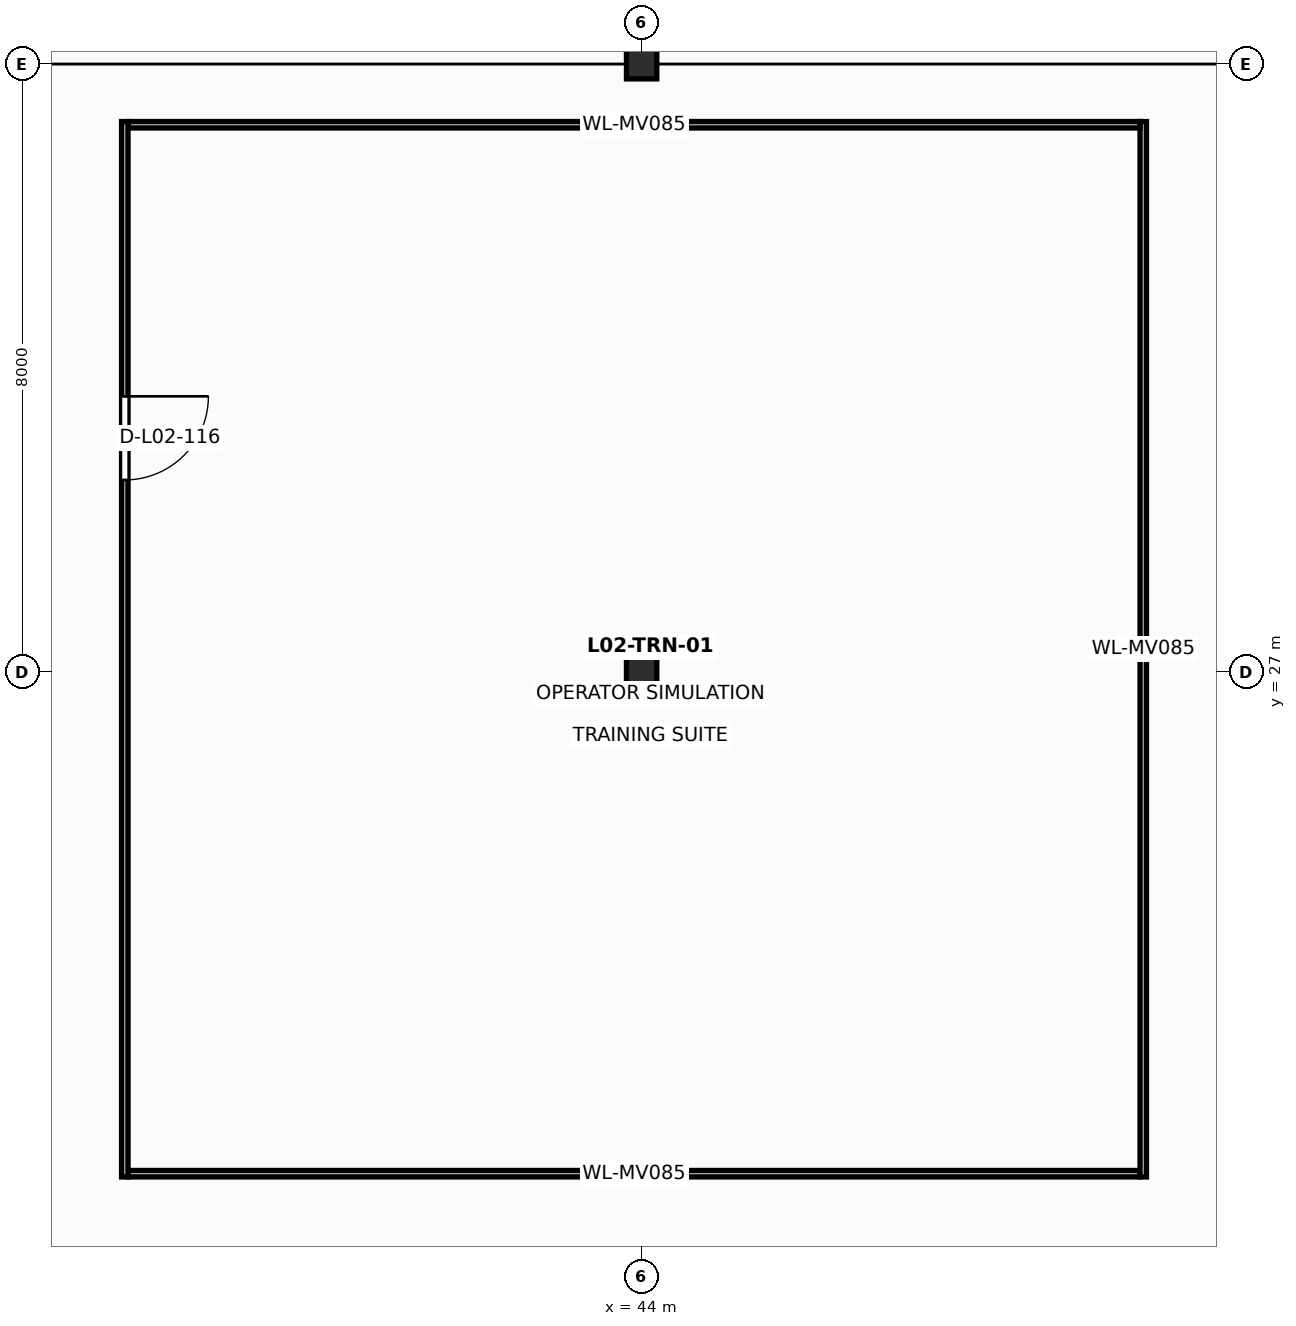
"""IFC4 building model, lengths in metres.
Left out: names, types, materials, properties, quantities, classifications, styles, units other than length and angle.
Written with IfcOpenShell. Run it as: python <this file> out.ifc"""

import sys

from ifc_helpers import new_model, si_unit, direction, frame, frame_2d, origin, origin_2d, place, context, subcontext, project, spatial, rectangle, i_section, extrude, element, fill, save


model = new_model("IFC4")
c1 = context("Model", 3, precision=1e-05, world=origin(), true_north=direction((0.0, 1.0)))
c2 = subcontext(c1, "Body", "Model", "MODEL_VIEW")
j1 = project(units=[si_unit("LENGTHUNIT", "METRE"), si_unit("PLANEANGLEUNIT", "RADIAN")], contexts=[c1])
p1 = place(None, origin())
s1 = spatial("IfcSite", under=j1, at=p1, CompositionType="ELEMENT")
p2 = place(p1, origin())
s2 = spatial("IfcBuilding", under=s1, at=p2, CompositionType="ELEMENT")
p3 = place(p2, frame((0.0, 0.0, 11.2)))
s3 = spatial("IfcBuildingStorey", under=s2, at=p3, CompositionType="ELEMENT", Elevation=11.2)
for number, where, z_axis, x_axis in (
    (1, (44.0, 27.0, 0.0), (0.0, 0.0, 1.0), (1.0, 0.0, 0.0)),
    (2, (44.0, 35.0, 0.0), (0.0, 0.0, 1.0), (1.0, 0.0, 0.0)),
):
    element("IfcColumn", number, at=place(p3, frame(where, z_axis=z_axis, x_axis=x_axis)), inside=s3, PredefinedType="COLUMN", context=c2, shape_type="SweptSolid", body=[
        extrude(i_section(OverallWidth=0.399, OverallDepth=0.393, WebThickness=0.023, FlangeThickness=0.037, at=origin_2d()), origin(), (0.0, 0.0, 1.0), 4.4),
    ])
p4 = place(p3, frame((37.242, 20.4, 0.0), z_axis=(0.0, 0.0, 1.0), x_axis=(1.0, 0.0, 0.0)))
e3 = element("IfcWall", 3, at=p4, inside=s3, PredefinedType="MOVABLE", context=c2, shape_type="SweptSolid", body=[
    extrude(rectangle(XDim=13.316, YDim=0.085, at=frame_2d((6.658, 0.0))), origin(), (0.0, 0.0, 1.0), 4.12),
])
p5 = place(p3, frame((50.6, 20.357, 0.0), z_axis=(0.0, 0.0, 1.0), x_axis=(0.0, 1.0, 0.0)))
e4 = element("IfcWall", 4, at=p5, inside=s3, PredefinedType="MOVABLE", context=c2, shape_type="SweptSolid", body=[
    extrude(rectangle(XDim=13.885, YDim=0.085, at=frame_2d((6.942, 0.0))), origin(), (0.0, 0.0, 1.0), 4.12),
])
p6 = place(p3, frame((50.558, 34.2, 0.0), z_axis=(0.0, 0.0, 1.0), x_axis=(-1.0, 0.0, 0.0)))
e5 = element("IfcWall", 5, at=p6, inside=s3, PredefinedType="MOVABLE", context=c2, shape_type="SweptSolid", body=[
    extrude(rectangle(XDim=13.316, YDim=0.085, at=frame_2d((6.658, 0.0))), origin(), (0.0, 0.0, 1.0), 4.12),
])
p7 = place(p3, frame((37.2, 34.242, 0.0), z_axis=(0.0, 0.0, 1.0), x_axis=(0.0, -1.0, 0.0)))
e6 = element("IfcWall", 6, at=p7, inside=s3, PredefinedType="MOVABLE", context=c2, shape_type="SweptSolid", body=[
    extrude(rectangle(XDim=13.885, YDim=0.085, at=frame_2d((6.942, 0.0))), origin(), (0.0, 0.0, 1.0), 4.12),
])
p8 = place(p7, frame((3.615, 0.0, 0.0)))
e7 = element("IfcOpeningElement", 7, at=p8, cuts=e6, PredefinedType="OPENING", context=c2, shape_type="SweptSolid", body=[
    extrude(rectangle(XDim=1.1, YDim=2.18, at=frame_2d((0.55, 1.09))), frame((0.0, 0.052, 0.0), z_axis=(0.0, -1.0, 0.0), x_axis=(1.0, 0.0, 0.0)), (0.0, 0.0, 1.0), 0.105),
])
p9 = place(p8, origin())
e8 = element("IfcDoor", 8, at=p9, inside=s3, OperationType="SINGLE_SWING_LEFT", PredefinedType="DOOR", context=c2, shape_type="SweptSolid", body=[
    extrude(rectangle(XDim=1.1, YDim=2.18, at=frame_2d((0.55, 1.09))), frame((0.0, 0.025, 0.0), z_axis=(0.0, -1.0, 0.0), x_axis=(1.0, 0.0, 0.0)), (0.0, 0.0, 1.0), 0.05),
])
fill(e7, e8)
save(model, sys.argv[1])
